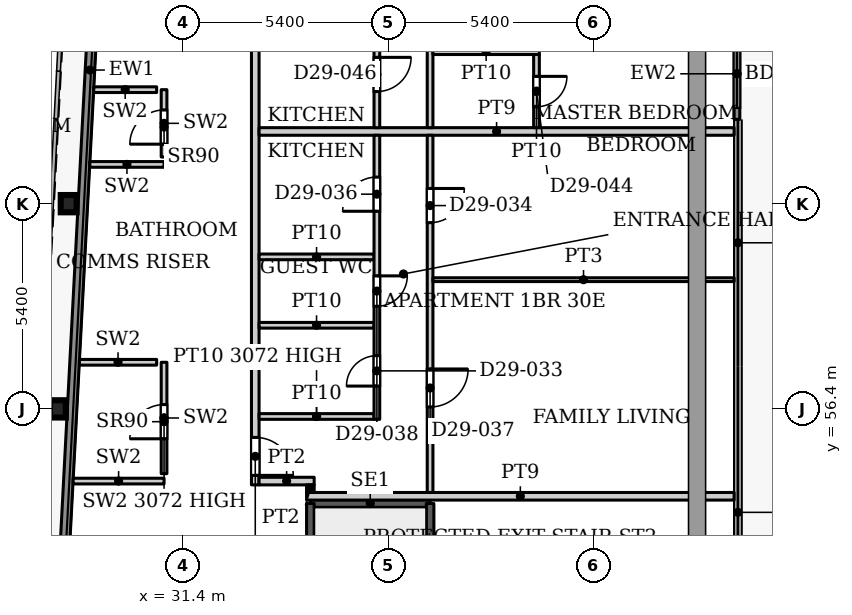
"""IFC4 building model, lengths in metres.
Left out: names, types, materials, properties, quantities, classifications, styles, units other than length and angle.
Written with IfcOpenShell. Run it as: python <this file> out.ifc"""

import sys

from ifc_helpers import new_model, si_unit, direction, frame, frame_2d, origin, origin_2d, place, context, subcontext, project, spatial, rectangle, i_section, extrude, source, transform, mapped, element, fill, save


model = new_model("IFC4")
c1 = context("Model", 3, precision=1e-05, world=origin(), true_north=direction((0.0, 1.0)))
c2 = subcontext(c1, "Body", "Model", "MODEL_VIEW")
j1 = project(units=[si_unit("LENGTHUNIT", "METRE"), si_unit("PLANEANGLEUNIT", "RADIAN")], contexts=[c1])
p1 = place(None, origin())
s1 = spatial("IfcSite", under=j1, at=p1, CompositionType="ELEMENT")
p2 = place(p1, origin())
s2 = spatial("IfcBuilding", under=s1, at=p2, CompositionType="ELEMENT")
p3 = place(p2, frame((0.0, 0.0, 129.2)))
s3 = spatial("IfcBuildingStorey", under=s2, at=p3, CompositionType="ELEMENT", Elevation=129.2)
for number, where, z_axis, x_axis in (
    (1, (28.106, 56.4, 0.0), (0.0, 0.0, 1.0), (1.0, 0.0, 0.0)),
    (2, (28.39, 61.8, 0.0), (0.0, 0.0, 1.0), (1.0, 0.0, 0.0)),
):
    element("IfcColumn", number, at=place(p3, frame(where, z_axis=z_axis, x_axis=x_axis)), inside=s3, PredefinedType="COLUMN", context=c2, shape_type="SweptSolid", body=[
        extrude(i_section(OverallWidth=0.418, OverallDepth=0.455, WebThickness=0.042, FlangeThickness=0.068, FilletRadius=0.014, at=origin_2d()), origin(), (0.0, 0.0, 1.0), 3.9),
    ])
p4 = place(p3, frame((27.195, 31.969, 0.0), z_axis=(0.0, 0.0, 1.0), x_axis=(0.052554995867, 0.998618031286, 0.0)))
e3 = element("IfcWall", 3, at=p4, inside=s3, PredefinedType="SOLIDWALL", context=c2, shape_type="SweptSolid", body=[
    extrude(rectangle(XDim=66.787, YDim=0.25, at=frame_2d((33.394, 0.0))), origin(), (0.0, 0.0, 1.0), 3.75),
])
p5 = place(p3, frame((45.975, 66.418, 0.0), z_axis=(0.0, 0.0, 1.0), x_axis=(0.0, -1.0, 0.0)))
e4 = element("IfcWall", 4, at=p5, inside=s3, PredefinedType="SOLIDWALL", context=c2, shape_type="SweptSolid", body=[
    extrude(rectangle(XDim=2.4, YDim=0.15, at=frame_2d((1.2, 0.0))), origin(), (0.0, 0.0, 1.0), 3.75),
])
p6 = place(p5, frame((0.3, 0.0, 0.0)))
e5 = element("IfcOpeningElement", 5, at=p6, cuts=e4, PredefinedType="OPENING", context=c2, shape_type="SweptSolid", body=[
    extrude(rectangle(XDim=1.8, YDim=2.4, at=frame_2d((0.9, 1.2))), frame((0.0, 0.085, 0.0), z_axis=(0.0, -1.0, 0.0), x_axis=(1.0, 0.0, 0.0)), (0.0, 0.0, 1.0), 0.17),
])
p7 = place(p3, frame((34.75, 53.91, 0.0), z_axis=(0.0, 0.0, 1.0), x_axis=(1.0, 0.0, 0.0)))
e6 = element("IfcWall", 6, at=p7, inside=s3, PredefinedType="SHEAR", context=c2, shape_type="SweptSolid", body=[
    extrude(rectangle(XDim=3.15, YDim=0.2, at=frame_2d((1.575, 0.0))), origin(), (0.0, 0.0, 1.0), 3.9),
])
p8 = place(p3, frame((34.75, 47.5, 0.0), z_axis=(0.0, 0.0, 1.0), x_axis=(0.0, 1.0, 0.0)))
e7 = element("IfcWall", 7, at=p8, inside=s3, PredefinedType="SHEAR", context=c2, shape_type="SweptSolid", body=[
    extrude(rectangle(XDim=6.41, YDim=0.2, at=frame_2d((3.205, 0.0))), origin(), (0.0, 0.0, 1.0), 3.9),
])
p9 = place(p3, frame((37.9, 44.75, 0.0), z_axis=(0.0, 0.0, 1.0), x_axis=(0.0, 1.0, 0.0)))
e8 = element("IfcWall", 8, at=p9, inside=s3, PredefinedType="SHEAR", context=c2, shape_type="SweptSolid", body=[
    extrude(rectangle(XDim=9.16, YDim=0.2, at=frame_2d((4.58, 0.0))), origin(), (0.0, 0.0, 1.0), 3.9),
])
p10 = place(p3, frame((28.508, 54.5, 0.0), z_axis=(0.0, 0.0, 1.0), x_axis=(1.0, 0.0, 0.0)))
e9 = element("IfcWall", 9, at=p10, inside=s3, PredefinedType="PARTITIONING", context=c2, shape_type="SweptSolid", body=[
    extrude(rectangle(XDim=2.392, YDim=0.15, at=frame_2d((1.196, 0.0))), origin(), (0.0, 0.0, 1.0), 3.9),
])
p11 = place(p3, frame((30.9, 54.695, 0.0), z_axis=(0.0, 0.0, 1.0), x_axis=(0.0, 1.0, 0.0)))
e10 = element("IfcWall", 10, at=p11, inside=s3, PredefinedType="PARTITIONING", context=c2, shape_type="SweptSolid", body=[
    extrude(rectangle(XDim=2.931, YDim=0.15, at=frame_2d((1.465, 0.0))), origin(), (0.0, 0.0, 1.0), 3.072),
])
p12 = place(p11, frame((0.918, 0.0, 0.0)))
e11 = element("IfcOpeningElement", 11, at=p12, cuts=e10, PredefinedType="OPENING", context=c2, shape_type="SweptSolid", body=[
    extrude(rectangle(XDim=0.9, YDim=2.2, at=frame_2d((0.45, 1.1))), frame((0.0, 0.085, 0.0), z_axis=(0.0, -1.0, 0.0), x_axis=(1.0, 0.0, 0.0)), (0.0, 0.0, 1.0), 0.17),
])
p13 = place(p3, frame((28.673, 57.626, 0.0), z_axis=(0.0, 0.0, 1.0), x_axis=(1.0, 0.0, 0.0)))
e12 = element("IfcWall", 12, at=p13, inside=s3, PredefinedType="PARTITIONING", context=c2, shape_type="SweptSolid", body=[
    extrude(rectangle(XDim=2.032, YDim=0.15, at=frame_2d((1.016, 0.0))), origin(), (0.0, 0.0, 1.0), 3.9),
])
p14 = place(p3, frame((28.947, 62.833, 0.0), z_axis=(0.0, 0.0, 1.0), x_axis=(1.0, 0.0, 0.0)))
e13 = element("IfcWall", 13, at=p14, inside=s3, PredefinedType="PARTITIONING", context=c2, shape_type="SweptSolid", body=[
    extrude(rectangle(XDim=1.953, YDim=0.15, at=frame_2d((0.977, 0.0))), origin(), (0.0, 0.0, 1.0), 3.9),
])
p15 = place(p3, frame((30.9, 63.028, 0.0), z_axis=(0.0, 0.0, 1.0), x_axis=(0.0, 1.0, 0.0)))
e14 = element("IfcWall", 14, at=p15, inside=s3, PredefinedType="PARTITIONING", context=c2, shape_type="SweptSolid", body=[
    extrude(rectangle(XDim=1.772, YDim=0.15, at=frame_2d((0.886, 0.0))), origin(), (0.0, 0.0, 1.0), 3.9),
])
p16 = place(p15, frame((0.338, 0.0, 0.0)))
e15 = element("IfcOpeningElement", 15, at=p16, cuts=e14, PredefinedType="OPENING", context=c2, shape_type="SweptSolid", body=[
    extrude(rectangle(XDim=0.9, YDim=2.2, at=frame_2d((0.45, 1.1))), frame((0.0, 0.085, 0.0), z_axis=(0.0, -1.0, 0.0), x_axis=(1.0, 0.0, 0.0)), (0.0, 0.0, 1.0), 0.17),
])
p17 = place(p3, frame((29.05, 64.8, 0.0), z_axis=(0.0, 0.0, 1.0), x_axis=(1.0, 0.0, 0.0)))
e16 = element("IfcWall", 16, at=p17, inside=s3, PredefinedType="PARTITIONING", context=c2, shape_type="SweptSolid", body=[
    extrude(rectangle(XDim=1.655, YDim=0.15, at=frame_2d((0.828, 0.0))), origin(), (0.0, 0.0, 1.0), 3.9),
])
p18 = place(p3, frame((33.3, 54.4, 0.0), z_axis=(0.0, 0.0, 1.0), x_axis=(0.0, 1.0, 0.0)))
e17 = element("IfcWall", 17, at=p18, inside=s3, PredefinedType="PARTITIONING", context=c2, shape_type="SweptSolid", body=[
    extrude(rectangle(XDim=24.95, YDim=0.2, at=frame_2d((12.475, 0.0))), origin(), (0.0, 0.0, 1.0), 3.6),
])
p19 = place(p18, frame((0.25, 0.0, 0.0)))
e18 = element("IfcOpeningElement", 18, at=p19, cuts=e17, PredefinedType="OPENING", context=c2, shape_type="SweptSolid", body=[
    extrude(rectangle(XDim=1.0, YDim=2.1, at=frame_2d((0.5, 1.05))), frame((0.0, 0.11, 0.0), z_axis=(0.0, -1.0, 0.0), x_axis=(1.0, 0.0, 0.0)), (0.0, 0.0, 1.0), 0.22),
])
p20 = place(p18, frame((20.5, 0.0, 0.0)))
e19 = element("IfcOpeningElement", 19, at=p20, cuts=e17, PredefinedType="OPENING", context=c2, shape_type="SweptSolid", body=[
    extrude(rectangle(XDim=1.0, YDim=2.1, at=frame_2d((0.5, 1.05))), frame((0.0, 0.11, 0.0), z_axis=(0.0, -1.0, 0.0), x_axis=(1.0, 0.0, 0.0)), (0.0, 0.0, 1.0), 0.22),
])
p21 = place(p3, frame((33.4, 54.5, 0.0), z_axis=(0.0, 0.0, 1.0), x_axis=(1.0, 0.0, 0.0)))
e20 = element("IfcWall", 20, at=p21, inside=s3, PredefinedType="PARTITIONING", context=c2, shape_type="SweptSolid", body=[
    extrude(rectangle(XDim=1.45, YDim=0.2, at=frame_2d((0.725, 0.0))), origin(), (0.0, 0.0, 1.0), 3.6),
])
p22 = place(p3, frame((33.4, 56.2, 0.0), z_axis=(0.0, 0.0, 1.0), x_axis=(1.0, 0.0, 0.0)))
e21 = element("IfcWall", 21, at=p22, inside=s3, PredefinedType="PARTITIONING", context=c2, shape_type="SweptSolid", body=[
    extrude(rectangle(XDim=3.025, YDim=0.15, at=frame_2d((1.513, 0.0))), origin(), (0.0, 0.0, 1.0), 3.072),
])
for number, where, z_axis, x_axis in (
    (22, (33.4, 58.6, 0.0), (0.0, 0.0, 1.0), (1.0, 0.0, 0.0)),
    (23, (33.4, 60.4, 0.0), (0.0, 0.0, 1.0), (1.0, 0.0, 0.0)),
):
    element("IfcWall", number, at=place(p3, frame(where, z_axis=z_axis, x_axis=x_axis)), inside=s3, PredefinedType="PARTITIONING", context=c2, shape_type="SweptSolid", body=[
        extrude(rectangle(XDim=3.025, YDim=0.15, at=frame_2d((1.513, 0.0))), origin(), (0.0, 0.0, 1.0), 3.6),
    ])
p23 = place(p3, frame((33.4, 63.7, 0.0), z_axis=(0.0, 0.0, 1.0), x_axis=(1.0, 0.0, 0.0)))
e24 = element("IfcWall", 24, at=p23, inside=s3, PredefinedType="PARTITIONING", context=c2, shape_type="SweptSolid", body=[
    extrude(rectangle(XDim=12.5, YDim=0.2, at=frame_2d((6.25, 0.0))), origin(), (0.0, 0.0, 1.0), 3.6),
])
p24 = place(p3, frame((34.65, 54.1, 0.0), z_axis=(0.0, 0.0, 1.0), x_axis=(1.0, 0.0, 0.0)))
e25 = element("IfcWall", 25, at=p24, inside=s3, PredefinedType="PARTITIONING", context=c2, shape_type="SweptSolid", body=[
    extrude(rectangle(XDim=11.25, YDim=0.2, at=frame_2d((5.625, 0.0))), origin(), (0.0, 0.0, 1.0), 3.6),
])
p25 = place(p3, frame((34.75, 54.2, 0.0), z_axis=(0.0, 0.0, 1.0), x_axis=(0.0, 1.0, 0.0)))
e26 = element("IfcWall", 26, at=p25, inside=s3, PredefinedType="PARTITIONING", context=c2, shape_type="SweptSolid", body=[
    extrude(rectangle(XDim=0.2, YDim=0.2, at=frame_2d((0.1, 0.0))), origin(), (0.0, 0.0, 1.0), 3.6),
])
p26 = place(p3, frame((36.5, 56.125, 0.0), z_axis=(0.0, 0.0, 1.0), x_axis=(0.0, 1.0, 0.0)))
e27 = element("IfcWall", 27, at=p26, inside=s3, PredefinedType="PARTITIONING", context=c2, shape_type="SweptSolid", body=[
    extrude(rectangle(XDim=7.475, YDim=0.15, at=frame_2d((3.738, 0.0))), origin(), (0.0, 0.0, 1.0), 3.6),
])
p27 = place(p26, frame((0.875, 0.0, 0.0)))
e28 = element("IfcOpeningElement", 28, at=p27, cuts=e27, PredefinedType="OPENING", context=c2, shape_type="SweptSolid", body=[
    extrude(rectangle(XDim=0.8, YDim=2.1, at=frame_2d((0.4, 1.05))), frame((0.0, 0.085, 0.0), z_axis=(0.0, -1.0, 0.0), x_axis=(1.0, 0.0, 0.0)), (0.0, 0.0, 1.0), 0.17),
])
p28 = place(p26, frame((5.475, 0.0, 0.0)))
e29 = element("IfcOpeningElement", 29, at=p28, cuts=e27, PredefinedType="OPENING", context=c2, shape_type="SweptSolid", body=[
    extrude(rectangle(XDim=0.9, YDim=2.1, at=frame_2d((0.45, 1.05))), frame((0.0, 0.085, 0.0), z_axis=(0.0, -1.0, 0.0), x_axis=(1.0, 0.0, 0.0)), (0.0, 0.0, 1.0), 0.17),
])
p29 = place(p26, frame((2.975, 0.0, 0.0)))
e30 = element("IfcOpeningElement", 30, at=p29, cuts=e27, PredefinedType="OPENING", context=c2, shape_type="SweptSolid", body=[
    extrude(rectangle(XDim=0.8, YDim=2.1, at=frame_2d((0.4, 1.05))), frame((0.0, 0.085, 0.0), z_axis=(0.0, -1.0, 0.0), x_axis=(1.0, 0.0, 0.0)), (0.0, 0.0, 1.0), 0.17),
])
p30 = place(p3, frame((36.5, 63.8, 0.0), z_axis=(0.0, 0.0, 1.0), x_axis=(0.0, 1.0, 0.0)))
e31 = element("IfcWall", 31, at=p30, inside=s3, PredefinedType="PARTITIONING", context=c2, shape_type="SweptSolid", body=[
    extrude(rectangle(XDim=10.75, YDim=0.15, at=frame_2d((5.375, 0.0))), origin(), (0.0, 0.0, 1.0), 3.6),
])
p31 = place(p30, frame((3.55, 0.0, 0.0)))
e32 = element("IfcOpeningElement", 32, at=p31, cuts=e31, PredefinedType="OPENING", context=c2, shape_type="SweptSolid", body=[
    extrude(rectangle(XDim=0.8, YDim=2.1, at=frame_2d((0.4, 1.05))), frame((0.0, 0.085, 0.0), z_axis=(0.0, -1.0, 0.0), x_axis=(1.0, 0.0, 0.0)), (0.0, 0.0, 1.0), 0.17),
])
p32 = place(p30, frame((5.65, 0.0, 0.0)))
e33 = element("IfcOpeningElement", 33, at=p32, cuts=e31, PredefinedType="OPENING", context=c2, shape_type="SweptSolid", body=[
    extrude(rectangle(XDim=0.8, YDim=2.1, at=frame_2d((0.4, 1.05))), frame((0.0, 0.085, 0.0), z_axis=(0.0, -1.0, 0.0), x_axis=(1.0, 0.0, 0.0)), (0.0, 0.0, 1.0), 0.17),
])
p33 = place(p30, frame((9.25, 0.0, 0.0)))
e34 = element("IfcOpeningElement", 34, at=p33, cuts=e31, PredefinedType="OPENING", context=c2, shape_type="SweptSolid", body=[
    extrude(rectangle(XDim=0.8, YDim=2.1, at=frame_2d((0.4, 1.05))), frame((0.0, 0.085, 0.0), z_axis=(0.0, -1.0, 0.0), x_axis=(1.0, 0.0, 0.0)), (0.0, 0.0, 1.0), 0.17),
])
p34 = place(p30, frame((0.95, 0.0, 0.0)))
e35 = element("IfcOpeningElement", 35, at=p34, cuts=e31, PredefinedType="OPENING", context=c2, shape_type="SweptSolid", body=[
    extrude(rectangle(XDim=0.9, YDim=2.1, at=frame_2d((0.45, 1.05))), frame((0.0, 0.085, 0.0), z_axis=(0.0, -1.0, 0.0), x_axis=(1.0, 0.0, 0.0)), (0.0, 0.0, 1.0), 0.17),
])
p35 = place(p30, frame((7.45, 0.0, 0.0)))
e36 = element("IfcOpeningElement", 36, at=p35, cuts=e31, PredefinedType="OPENING", context=c2, shape_type="SweptSolid", body=[
    extrude(rectangle(XDim=0.8, YDim=2.1, at=frame_2d((0.4, 1.05))), frame((0.0, 0.085, 0.0), z_axis=(0.0, -1.0, 0.0), x_axis=(1.0, 0.0, 0.0)), (0.0, 0.0, 1.0), 0.17),
])
p36 = place(p3, frame((37.9, 54.2, 0.0), z_axis=(0.0, 0.0, 1.0), x_axis=(0.0, 1.0, 0.0)))
e37 = element("IfcWall", 37, at=p36, inside=s3, PredefinedType="PARTITIONING", context=c2, shape_type="SweptSolid", body=[
    extrude(rectangle(XDim=9.4, YDim=0.15, at=frame_2d((4.7, 0.0))), origin(), (0.0, 0.0, 1.0), 3.6),
])
p37 = place(p36, frame((7.1, 0.0, 0.0)))
e38 = element("IfcOpeningElement", 38, at=p37, cuts=e37, PredefinedType="OPENING", context=c2, shape_type="SweptSolid", body=[
    extrude(rectangle(XDim=0.9, YDim=2.1, at=frame_2d((0.45, 1.05))), frame((0.0, 0.085, 0.0), z_axis=(0.0, -1.0, 0.0), x_axis=(1.0, 0.0, 0.0)), (0.0, 0.0, 1.0), 0.17),
])
p38 = place(p36, frame((2.25, 0.0, 0.0)))
e39 = element("IfcOpeningElement", 39, at=p38, cuts=e37, PredefinedType="OPENING", context=c2, shape_type="SweptSolid", body=[
    extrude(rectangle(XDim=1.0, YDim=2.1, at=frame_2d((0.5, 1.05))), frame((0.0, 0.085, 0.0), z_axis=(0.0, -1.0, 0.0), x_axis=(1.0, 0.0, 0.0)), (0.0, 0.0, 1.0), 0.17),
])
p39 = place(p3, frame((37.9, 63.8, 0.0), z_axis=(0.0, 0.0, 1.0), x_axis=(0.0, 1.0, 0.0)))
e40 = element("IfcWall", 40, at=p39, inside=s3, PredefinedType="PARTITIONING", context=c2, shape_type="SweptSolid", body=[
    extrude(rectangle(XDim=15.45, YDim=0.15, at=frame_2d((7.725, 0.0))), origin(), (0.0, 0.0, 1.0), 3.6),
])
p40 = place(p39, frame((11.0, 0.0, 0.0)))
e41 = element("IfcOpeningElement", 41, at=p40, cuts=e40, PredefinedType="OPENING", context=c2, shape_type="SweptSolid", body=[
    extrude(rectangle(XDim=0.9, YDim=2.1, at=frame_2d((0.45, 1.05))), frame((0.0, 0.085, 0.0), z_axis=(0.0, -1.0, 0.0), x_axis=(1.0, 0.0, 0.0)), (0.0, 0.0, 1.0), 0.17),
])
p41 = place(p39, frame((13.7, 0.0, 0.0)))
e42 = element("IfcOpeningElement", 42, at=p41, cuts=e40, PredefinedType="OPENING", context=c2, shape_type="SweptSolid", body=[
    extrude(rectangle(XDim=0.9, YDim=2.1, at=frame_2d((0.45, 1.05))), frame((0.0, 0.085, 0.0), z_axis=(0.0, -1.0, 0.0), x_axis=(1.0, 0.0, 0.0)), (0.0, 0.0, 1.0), 0.17),
])
p42 = place(p39, frame((4.65, 0.0, 0.0)))
e43 = element("IfcOpeningElement", 43, at=p42, cuts=e40, PredefinedType="OPENING", context=c2, shape_type="SweptSolid", body=[
    extrude(rectangle(XDim=1.0, YDim=2.1, at=frame_2d((0.5, 1.05))), frame((0.0, 0.085, 0.0), z_axis=(0.0, -1.0, 0.0), x_axis=(1.0, 0.0, 0.0)), (0.0, 0.0, 1.0), 0.17),
])
p43 = place(p39, frame((7.65, 0.0, 0.0)))
e44 = element("IfcOpeningElement", 44, at=p43, cuts=e40, PredefinedType="OPENING", context=c2, shape_type="SweptSolid", body=[
    extrude(rectangle(XDim=1.6, YDim=2.1, at=frame_2d((0.8, 1.05))), frame((0.0, 0.085, 0.0), z_axis=(0.0, -1.0, 0.0), x_axis=(1.0, 0.0, 0.0)), (0.0, 0.0, 1.0), 0.17),
])
p44 = place(p39, frame((2.3, 0.0, 0.0)))
e45 = element("IfcOpeningElement", 45, at=p44, cuts=e40, PredefinedType="OPENING", context=c2, shape_type="SweptSolid", body=[
    extrude(rectangle(XDim=0.9, YDim=2.1, at=frame_2d((0.45, 1.05))), frame((0.0, 0.085, 0.0), z_axis=(0.0, -1.0, 0.0), x_axis=(1.0, 0.0, 0.0)), (0.0, 0.0, 1.0), 0.17),
])
p45 = place(p3, frame((37.975, 59.8, 0.0), z_axis=(0.0, 0.0, 1.0), x_axis=(1.0, 0.0, 0.0)))
e46 = element("IfcWall", 46, at=p45, inside=s3, PredefinedType="PARTITIONING", context=c2, shape_type="SweptSolid", body=[
    extrude(rectangle(XDim=7.925, YDim=0.1, at=frame_2d((3.962, 0.0))), origin(), (0.0, 0.0, 1.0), 3.6),
])
p46 = place(p3, frame((37.975, 65.8, 0.0), z_axis=(0.0, 0.0, 1.0), x_axis=(1.0, 0.0, 0.0)))
e47 = element("IfcWall", 47, at=p46, inside=s3, PredefinedType="PARTITIONING", context=c2, shape_type="SweptSolid", body=[
    extrude(rectangle(XDim=2.8, YDim=0.15, at=frame_2d((1.4, 0.0))), origin(), (0.0, 0.0, 1.0), 3.6),
])
p47 = place(p3, frame((40.7, 63.8, 0.0), z_axis=(0.0, 0.0, 1.0), x_axis=(0.0, 1.0, 0.0)))
e48 = element("IfcWall", 48, at=p47, inside=s3, PredefinedType="PARTITIONING", context=c2, shape_type="SweptSolid", body=[
    extrude(rectangle(XDim=1.925, YDim=0.15, at=frame_2d((0.962, 0.0))), origin(), (0.0, 0.0, 1.0), 3.6),
])
p48 = place(p47, frame((0.55, 0.0, 0.0)))
e49 = element("IfcOpeningElement", 49, at=p48, cuts=e48, PredefinedType="OPENING", context=c2, shape_type="SweptSolid", body=[
    extrude(rectangle(XDim=0.8, YDim=2.1, at=frame_2d((0.4, 1.05))), frame((0.0, 0.085, 0.0), z_axis=(0.0, -1.0, 0.0), x_axis=(1.0, 0.0, 0.0)), (0.0, 0.0, 1.0), 0.17),
])
m1 = source(origin(), c2, "Body", "SweptSolid", [
    extrude(rectangle(XDim=1.8, YDim=2.4, at=frame_2d((0.9, 1.2))), frame((0.0, 0.025, 0.0), z_axis=(0.0, -1.0, 0.0), x_axis=(1.0, 0.0, 0.0)), (0.0, 0.0, 1.0), 0.05),
])
p49 = place(p6, origin())
e50 = element("IfcDoor", 50, at=p49, inside=s3, OperationType="SLIDING_TO_LEFT", PredefinedType="DOOR", context=c2, shape_type="MappedRepresentation", body=[
    mapped(m1, transform((0.0, 0.0, 0.0), x_axis=(1.0, 0.0, 0.0), y_axis=(0.0, 1.0, 0.0), z_axis=(0.0, 0.0, 1.0), scale=1.0)),
])
fill(e5, e50)
m2 = source(origin(), c2, "Body", "SweptSolid", [
    extrude(rectangle(XDim=0.9, YDim=2.2, at=frame_2d((0.45, 1.1))), frame((0.0, 0.025, 0.0), z_axis=(0.0, -1.0, 0.0), x_axis=(1.0, 0.0, 0.0)), (0.0, 0.0, 1.0), 0.05),
])
p50 = place(p12, origin())
e51 = element("IfcDoor", 51, at=p50, inside=s3, OperationType="SINGLE_SWING_LEFT", PredefinedType="DOOR", context=c2, shape_type="MappedRepresentation", body=[
    mapped(m2, transform((0.0, 0.0, 0.0), x_axis=(1.0, 0.0, 0.0), y_axis=(0.0, 1.0, 0.0), z_axis=(0.0, 0.0, 1.0), scale=1.0)),
])
fill(e11, e51)
p51 = place(p16, origin())
e52 = element("IfcDoor", 52, at=p51, inside=s3, OperationType="SINGLE_SWING_LEFT", PredefinedType="DOOR", context=c2, shape_type="MappedRepresentation", body=[
    mapped(m2, transform((0.0, 0.0, 0.0), x_axis=(1.0, 0.0, 0.0), y_axis=(0.0, 1.0, 0.0), z_axis=(0.0, 0.0, 1.0), scale=1.0)),
])
fill(e15, e52)
m3 = source(origin(), c2, "Body", "SweptSolid", [
    extrude(rectangle(XDim=0.8, YDim=2.1, at=frame_2d((0.4, 1.05))), frame((0.0, 0.025, 0.0), z_axis=(0.0, -1.0, 0.0), x_axis=(1.0, 0.0, 0.0)), (0.0, 0.0, 1.0), 0.05),
])
p52 = place(p27, origin())
e53 = element("IfcDoor", 53, at=p52, inside=s3, OperationType="SINGLE_SWING_LEFT", PredefinedType="DOOR", context=c2, shape_type="MappedRepresentation", body=[
    mapped(m3, transform((0.0, 0.0, 0.0), x_axis=(1.0, 0.0, 0.0), y_axis=(0.0, 1.0, 0.0), z_axis=(0.0, 0.0, 1.0), scale=1.0)),
])
fill(e28, e53)
m4 = source(origin(), c2, "Body", "SweptSolid", [
    extrude(rectangle(XDim=0.9, YDim=2.1, at=frame_2d((0.45, 1.05))), frame((0.0, 0.025, 0.0), z_axis=(0.0, -1.0, 0.0), x_axis=(1.0, 0.0, 0.0)), (0.0, 0.0, 1.0), 0.05),
])
p53 = place(p37, origin())
e54 = element("IfcDoor", 54, at=p53, inside=s3, OperationType="SINGLE_SWING_RIGHT", PredefinedType="DOOR", context=c2, shape_type="MappedRepresentation", body=[
    mapped(m4, transform((0.0, 0.0, 0.0), x_axis=(1.0, 0.0, 0.0), y_axis=(0.0, 1.0, 0.0), z_axis=(0.0, 0.0, 1.0), scale=1.0)),
])
fill(e38, e54)
m5 = source(origin(), c2, "Body", "SweptSolid", [
    extrude(rectangle(XDim=1.0, YDim=2.1, at=frame_2d((0.5, 1.05))), frame((0.0, 0.025, 0.0), z_axis=(0.0, -1.0, 0.0), x_axis=(1.0, 0.0, 0.0)), (0.0, 0.0, 1.0), 0.05),
])
p54 = place(p19, origin())
e55 = element("IfcDoor", 55, at=p54, inside=s3, OperationType="SINGLE_SWING_RIGHT", PredefinedType="DOOR", context=c2, shape_type="MappedRepresentation", body=[
    mapped(m5, transform((0.0, 0.0, 0.0), x_axis=(1.0, 0.0, 0.0), y_axis=(0.0, 1.0, 0.0), z_axis=(0.0, 0.0, 1.0), scale=1.0)),
])
fill(e18, e55)
p55 = place(p28, origin())
e56 = element("IfcDoor", 56, at=p55, inside=s3, OperationType="SINGLE_SWING_LEFT", PredefinedType="DOOR", context=c2, shape_type="MappedRepresentation", body=[
    mapped(m4, transform((0.0, 0.0, 0.0), x_axis=(1.0, 0.0, 0.0), y_axis=(0.0, 1.0, 0.0), z_axis=(0.0, 0.0, 1.0), scale=1.0)),
])
fill(e29, e56)
m6 = source(origin(), c2, "Body", "SweptSolid", [
    extrude(rectangle(XDim=1.0, YDim=2.1, at=frame_2d((0.5, 1.05))), frame((0.0, 0.025, 0.0), z_axis=(0.0, -1.0, 0.0), x_axis=(1.0, 0.0, 0.0)), (0.0, 0.0, 1.0), 0.05),
])
p56 = place(p38, origin())
e57 = element("IfcDoor", 57, at=p56, inside=s3, OperationType="SINGLE_SWING_RIGHT", PredefinedType="DOOR", context=c2, shape_type="MappedRepresentation", body=[
    mapped(m6, transform((0.0, 0.0, 0.0), x_axis=(1.0, 0.0, 0.0), y_axis=(0.0, 1.0, 0.0), z_axis=(0.0, 0.0, 1.0), scale=1.0)),
])
fill(e39, e57)
p57 = place(p29, origin())
e58 = element("IfcDoor", 58, at=p57, inside=s3, OperationType="SINGLE_SWING_RIGHT", PredefinedType="DOOR", context=c2, shape_type="MappedRepresentation", body=[
    mapped(m3, transform((0.0, 0.0, 0.0), x_axis=(1.0, 0.0, 0.0), y_axis=(0.0, 1.0, 0.0), z_axis=(0.0, 0.0, 1.0), scale=1.0)),
])
fill(e30, e58)
p58 = place(p48, origin())
e59 = element("IfcDoor", 59, at=p58, inside=s3, OperationType="SINGLE_SWING_RIGHT", PredefinedType="DOOR", context=c2, shape_type="MappedRepresentation", body=[
    mapped(m3, transform((0.0, 0.0, 0.0), x_axis=(1.0, 0.0, 0.0), y_axis=(0.0, 1.0, 0.0), z_axis=(0.0, 0.0, 1.0), scale=1.0)),
])
fill(e49, e59)
p59 = place(p34, origin())
e60 = element("IfcDoor", 60, at=p59, inside=s3, OperationType="SINGLE_SWING_RIGHT", PredefinedType="DOOR", context=c2, shape_type="MappedRepresentation", body=[
    mapped(m4, transform((0.0, 0.0, 0.0), x_axis=(1.0, 0.0, 0.0), y_axis=(0.0, 1.0, 0.0), z_axis=(0.0, 0.0, 1.0), scale=1.0)),
])
fill(e35, e60)
save(model, sys.argv[1])
